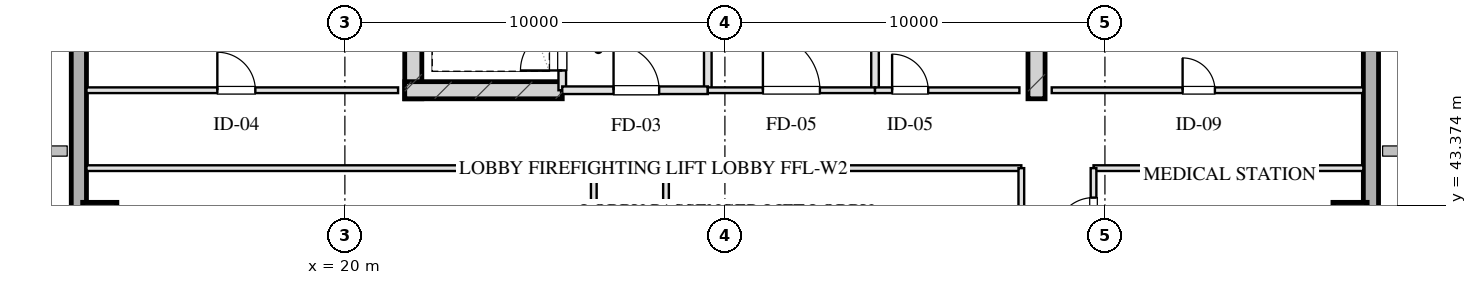
"""IFC4 building model, lengths in metres.
Left out: names, types, materials, properties, quantities, classifications, styles, units other than length and angle.
Written with IfcOpenShell. Run it as: python <this file> out.ifc"""

import sys

from ifc_helpers import new_model, si_unit, direction, frame, frame_2d, origin, origin_2d, place, context, subcontext, project, spatial, rectangle, hollow_rectangle, extrude, element, fill, save


model = new_model("IFC4")
c1 = context("Model", 3, precision=1e-05, world=origin(), true_north=direction((0.0, 1.0)))
c2 = subcontext(c1, "Body", "Model", "MODEL_VIEW")
j1 = project(units=[si_unit("LENGTHUNIT", "METRE"), si_unit("PLANEANGLEUNIT", "RADIAN")], contexts=[c1])
p1 = place(None, origin())
s1 = spatial("IfcSite", under=j1, at=p1, CompositionType="ELEMENT")
p2 = place(p1, origin())
s2 = spatial("IfcBuilding", under=s1, at=p2, CompositionType="ELEMENT")
p3 = place(p2, frame((0.0, 0.0, 205.85)))
s3 = spatial("IfcBuildingStorey", under=s2, at=p3, CompositionType="ELEMENT", Elevation=205.85)
for number, where, z_axis, x_axis in (
    (1, (21.8, 46.175, 0.0), (0.0, 0.0, 1.0), (0.0, 1.0, 0.0)),
    (2, (38.2, 46.175, 0.0), (0.0, 0.0, 1.0), (0.0, 1.0, 0.0)),
):
    element("IfcWall", number, at=place(p3, frame(where, z_axis=z_axis, x_axis=x_axis)), inside=s3, PredefinedType="SHEAR", context=c2, shape_type="SweptSolid", body=[
        extrude(rectangle(XDim=9.33, YDim=0.45, at=frame_2d((4.665, 0.0))), origin(), (0.0, 0.0, 1.0), 3.45),
    ])
p4 = place(p3, frame((21.575, 46.4, 0.0), z_axis=(0.0, 0.0, 1.0), x_axis=(1.0, 0.0, 0.0)))
e3 = element("IfcWall", 3, at=p4, inside=s3, PredefinedType="SHEAR", context=c2, shape_type="SweptSolid", body=[
    extrude(rectangle(XDim=4.145, YDim=0.45, at=frame_2d((2.073, 0.0))), origin(), (0.0, 0.0, 1.0), 3.45),
])
for number, where, z_axis, x_axis in (
    (4, (13.55, 43.0, 0.0), (0.0, 0.0, 1.0), (1.0, 0.0, 0.0)),
    (5, (46.45, 43.0, 0.0), (0.0, 0.0, 1.0), (1.0, 0.0, 0.0)),
):
    element("IfcColumn", number, at=place(p3, frame(where, z_axis=z_axis, x_axis=x_axis)), inside=s3, PredefinedType="COLUMN", context=c2, shape_type="SweptSolid", body=[
        extrude(hollow_rectangle(XDim=0.9, YDim=0.9, WallThickness=0.032, at=origin_2d()), origin(), (0.0, 0.0, 1.0), 3.451),
    ])
p5 = place(p3, frame((13.0, 10.8, 0.0), z_axis=(0.0, 0.0, 1.0), x_axis=(0.0, 1.0, 0.0)))
e6 = element("IfcWall", 6, at=p5, inside=s3, PredefinedType="SOLIDWALL", context=c2, shape_type="SweptSolid", body=[
    extrude(rectangle(XDim=46.4, YDim=0.4, at=frame_2d((23.2, 0.0))), origin(), (0.0, 0.0, 1.0), 2.61),
])
p6 = place(p5, frame((15.75, 0.0, 0.75)))
e7 = element("IfcOpeningElement", 7, at=p6, cuts=e6, PredefinedType="OPENING", context=c2, shape_type="SweptSolid", body=[
    extrude(rectangle(XDim=2.1, YDim=1.46, at=frame_2d((1.05, 0.73))), frame((0.0, 0.21, 0.0), z_axis=(0.0, -1.0, 0.0), x_axis=(1.0, 0.0, 0.0)), (0.0, 0.0, 1.0), 0.42),
])
p7 = place(p5, frame((19.55, 0.0, 0.75)))
e8 = element("IfcOpeningElement", 8, at=p7, cuts=e6, PredefinedType="OPENING", context=c2, shape_type="SweptSolid", body=[
    extrude(rectangle(XDim=2.1, YDim=1.46, at=frame_2d((1.05, 0.73))), frame((0.0, 0.21, 0.0), z_axis=(0.0, -1.0, 0.0), x_axis=(1.0, 0.0, 0.0)), (0.0, 0.0, 1.0), 0.42),
])
p8 = place(p5, frame((27.05, 0.0, 0.0)))
e9 = element("IfcOpeningElement", 9, at=p8, cuts=e6, PredefinedType="OPENING", context=c2, shape_type="SweptSolid", body=[
    extrude(rectangle(XDim=1.1, YDim=2.15, at=frame_2d((0.55, 1.075))), frame((0.0, 0.21, 0.0), z_axis=(0.0, -1.0, 0.0), x_axis=(1.0, 0.0, 0.0)), (0.0, 0.0, 1.0), 0.42),
])
p9 = place(p3, frame((47.0, 57.2, 0.0), z_axis=(0.0, 0.0, 1.0), x_axis=(0.0, -1.0, 0.0)))
e10 = element("IfcWall", 10, at=p9, inside=s3, PredefinedType="SOLIDWALL", context=c2, shape_type="SweptSolid", body=[
    extrude(rectangle(XDim=46.4, YDim=0.4, at=frame_2d((23.2, 0.0))), origin(), (0.0, 0.0, 1.0), 2.61),
])
p10 = place(p9, frame((28.55, 0.0, 0.75)))
e11 = element("IfcOpeningElement", 11, at=p10, cuts=e10, PredefinedType="OPENING", context=c2, shape_type="SweptSolid", body=[
    extrude(rectangle(XDim=2.1, YDim=1.46, at=frame_2d((1.05, 0.73))), frame((0.0, 0.21, 0.0), z_axis=(0.0, -1.0, 0.0), x_axis=(1.0, 0.0, 0.0)), (0.0, 0.0, 1.0), 0.42),
])
p11 = place(p9, frame((24.75, 0.0, 0.75)))
e12 = element("IfcOpeningElement", 12, at=p11, cuts=e10, PredefinedType="OPENING", context=c2, shape_type="SweptSolid", body=[
    extrude(rectangle(XDim=2.1, YDim=1.46, at=frame_2d((1.05, 0.73))), frame((0.0, 0.21, 0.0), z_axis=(0.0, -1.0, 0.0), x_axis=(1.0, 0.0, 0.0)), (0.0, 0.0, 1.0), 0.42),
])
p12 = place(p9, frame((16.667, 0.0, 0.0)))
e13 = element("IfcOpeningElement", 13, at=p12, cuts=e10, PredefinedType="OPENING", context=c2, shape_type="SweptSolid", body=[
    extrude(rectangle(XDim=1.1, YDim=2.15, at=frame_2d((0.55, 1.075))), frame((0.0, 0.21, 0.0), z_axis=(0.0, -1.0, 0.0), x_axis=(1.0, 0.0, 0.0)), (0.0, 0.0, 1.0), 0.42),
])
p13 = place(p3, frame((25.72, 46.4, 0.0), z_axis=(0.0, 0.0, 1.0), x_axis=(0.0, 1.0, 0.0)))
e14 = element("IfcWall", 14, at=p13, inside=s3, PredefinedType="PARTITIONING", context=c2, shape_type="SweptSolid", body=[
    extrude(rectangle(XDim=1.9, YDim=0.2, at=frame_2d((0.95, 0.0))), origin(), (0.0, 0.0, 1.0), 3.175),
])
p14 = place(p13, frame((0.52, 0.0, 0.0)))
e15 = element("IfcOpeningElement", 15, at=p14, cuts=e14, PredefinedType="OPENING", context=c2, shape_type="SweptSolid", body=[
    extrude(rectangle(XDim=1.1, YDim=2.05, at=frame_2d((0.55, 1.025))), frame((0.0, 0.11, 0.0), z_axis=(0.0, -1.0, 0.0), x_axis=(1.0, 0.0, 0.0)), (0.0, 0.0, 1.0), 0.22),
])
p15 = place(p3, frame((29.55, 46.4, 0.0), z_axis=(0.0, 0.0, 1.0), x_axis=(0.0, 1.0, 0.0)))
e16 = element("IfcWall", 16, at=p15, inside=s3, PredefinedType="PARTITIONING", context=c2, shape_type="SweptSolid", body=[
    extrude(rectangle(XDim=8.43, YDim=0.2, at=frame_2d((4.215, 0.0))), origin(), (0.0, 0.0, 1.0), 3.175),
])
p16 = place(p3, frame((25.72, 46.4, 0.0), z_axis=(0.0, 0.0, 1.0), x_axis=(1.0, 0.0, 0.0)))
e17 = element("IfcWall", 17, at=p16, inside=s3, PredefinedType="PARTITIONING", context=c2, shape_type="SweptSolid", body=[
    extrude(rectangle(XDim=3.83, YDim=0.2, at=frame_2d((1.915, 0.0))), origin(), (0.0, 0.0, 1.0), 3.175),
])
p17 = place(p16, frame((1.35, 0.0, 0.0)))
e18 = element("IfcOpeningElement", 18, at=p17, cuts=e17, PredefinedType="OPENING", context=c2, shape_type="SweptSolid", body=[
    extrude(rectangle(XDim=1.2, YDim=2.05, at=frame_2d((0.6, 1.025))), frame((0.0, 0.11, 0.0), z_axis=(0.0, -1.0, 0.0), x_axis=(1.0, 0.0, 0.0)), (0.0, 0.0, 1.0), 0.22),
])
p18 = place(p3, frame((33.95, 46.4, 0.0), z_axis=(0.0, 0.0, 1.0), x_axis=(0.0, 1.0, 0.0)))
e19 = element("IfcWall", 19, at=p18, inside=s3, PredefinedType="PARTITIONING", context=c2, shape_type="SweptSolid", body=[
    extrude(rectangle(XDim=8.43, YDim=0.2, at=frame_2d((4.215, 0.0))), origin(), (0.0, 0.0, 1.0), 3.175),
])
p19 = place(p3, frame((29.55, 46.4, 0.0), z_axis=(0.0, 0.0, 1.0), x_axis=(1.0, 0.0, 0.0)))
e20 = element("IfcWall", 20, at=p19, inside=s3, PredefinedType="PARTITIONING", context=c2, shape_type="SweptSolid", body=[
    extrude(rectangle(XDim=4.4, YDim=0.15, at=frame_2d((2.2, 0.0))), origin(), (0.0, 0.0, 1.0), 3.175),
])
p20 = place(p19, frame((1.45, 0.0, 0.0)))
e21 = element("IfcOpeningElement", 21, at=p20, cuts=e20, PredefinedType="OPENING", context=c2, shape_type="SweptSolid", body=[
    extrude(rectangle(XDim=1.5, YDim=2.05, at=frame_2d((0.75, 1.025))), frame((0.0, 0.085, 0.0), z_axis=(0.0, -1.0, 0.0), x_axis=(1.0, 0.0, 0.0)), (0.0, 0.0, 1.0), 0.17),
])
p21 = place(p3, frame((33.95, 46.4, 0.0), z_axis=(0.0, 0.0, 1.0), x_axis=(1.0, 0.0, 0.0)))
e22 = element("IfcWall", 22, at=p21, inside=s3, PredefinedType="PARTITIONING", context=c2, shape_type="SweptSolid", body=[
    extrude(rectangle(XDim=3.8, YDim=0.15, at=frame_2d((1.9, 0.0))), origin(), (0.0, 0.0, 1.0), 3.175),
])
p22 = place(p21, frame((0.45, 0.0, 0.0)))
e23 = element("IfcOpeningElement", 23, at=p22, cuts=e22, PredefinedType="OPENING", context=c2, shape_type="SweptSolid", body=[
    extrude(rectangle(XDim=0.95, YDim=2.05, at=frame_2d((0.475, 1.025))), frame((0.0, 0.085, 0.0), z_axis=(0.0, -1.0, 0.0), x_axis=(1.0, 0.0, 0.0)), (0.0, 0.0, 1.0), 0.17),
])
p23 = place(p3, frame((13.2, 46.4, 0.0), z_axis=(0.0, 0.0, 1.0), x_axis=(1.0, 0.0, 0.0)))
e24 = element("IfcWall", 24, at=p23, inside=s3, PredefinedType="PARTITIONING", context=c2, shape_type="SweptSolid", body=[
    extrude(rectangle(XDim=8.2, YDim=0.15, at=frame_2d((4.1, 0.0))), origin(), (0.0, 0.0, 1.0), 3.175),
])
p24 = place(p23, frame((3.444, 0.0, 0.0)))
e25 = element("IfcOpeningElement", 25, at=p24, cuts=e24, PredefinedType="OPENING", context=c2, shape_type="SweptSolid", body=[
    extrude(rectangle(XDim=1.0, YDim=2.05, at=frame_2d((0.5, 1.025))), frame((0.0, 0.085, 0.0), z_axis=(0.0, -1.0, 0.0), x_axis=(1.0, 0.0, 0.0)), (0.0, 0.0, 1.0), 0.17),
])
p25 = place(p3, frame((38.6, 46.4, 0.0), z_axis=(0.0, 0.0, 1.0), x_axis=(1.0, 0.0, 0.0)))
e26 = element("IfcWall", 26, at=p25, inside=s3, PredefinedType="PARTITIONING", context=c2, shape_type="SweptSolid", body=[
    extrude(rectangle(XDim=8.2, YDim=0.15, at=frame_2d((4.1, 0.0))), origin(), (0.0, 0.0, 1.0), 3.175),
])
p26 = place(p25, frame((3.444, 0.0, 0.0)))
e27 = element("IfcOpeningElement", 27, at=p26, cuts=e26, PredefinedType="OPENING", context=c2, shape_type="SweptSolid", body=[
    extrude(rectangle(XDim=0.85, YDim=2.05, at=frame_2d((0.425, 1.025))), frame((0.0, 0.085, 0.0), z_axis=(0.0, -1.0, 0.0), x_axis=(1.0, 0.0, 0.0)), (0.0, 0.0, 1.0), 0.17),
])
p27 = place(p3, frame((13.2, 44.35, 0.0), z_axis=(0.0, 0.0, 1.0), x_axis=(1.0, 0.0, 0.0)))
e28 = element("IfcWall", 28, at=p27, inside=s3, PredefinedType="PARTITIONING", context=c2, shape_type="SweptSolid", body=[
    extrude(rectangle(XDim=13.35, YDim=0.15, at=frame_2d((6.675, 0.0))), origin(), (0.0, 0.0, 1.0), 3.175),
])
p28 = place(p3, frame((28.45, 44.35, 0.0), z_axis=(0.0, 0.0, 1.0), x_axis=(1.0, 0.0, 0.0)))
e29 = element("IfcWall", 29, at=p28, inside=s3, PredefinedType="PARTITIONING", context=c2, shape_type="SweptSolid", body=[
    extrude(rectangle(XDim=9.35, YDim=0.15, at=frame_2d((4.675, 0.0))), origin(), (0.0, 0.0, 1.0), 3.175),
])
p29 = place(p3, frame((39.7, 44.35, 0.0), z_axis=(0.0, 0.0, 1.0), x_axis=(1.0, 0.0, 0.0)))
e30 = element("IfcWall", 30, at=p29, inside=s3, PredefinedType="PARTITIONING", context=c2, shape_type="SweptSolid", body=[
    extrude(rectangle(XDim=7.1, YDim=0.15, at=frame_2d((3.55, 0.0))), origin(), (0.0, 0.0, 1.0), 3.175),
])
p30 = place(p3, frame((26.55, 23.65, 0.0), z_axis=(0.0, 0.0, 1.0), x_axis=(0.0, 1.0, 0.0)))
e31 = element("IfcWall", 31, at=p30, inside=s3, PredefinedType="PARTITIONING", context=c2, shape_type="SweptSolid", body=[
    extrude(rectangle(XDim=20.7, YDim=0.15, at=frame_2d((10.35, 0.0))), origin(), (0.0, 0.0, 1.0), 3.175),
])
p31 = place(p30, frame((4.075, 0.0, 0.0)))
e32 = element("IfcOpeningElement", 32, at=p31, cuts=e31, PredefinedType="OPENING", context=c2, shape_type="SweptSolid", body=[
    extrude(rectangle(XDim=1.0, YDim=2.05, at=frame_2d((0.5, 1.025))), frame((0.0, 0.085, 0.0), z_axis=(0.0, -1.0, 0.0), x_axis=(1.0, 0.0, 0.0)), (0.0, 0.0, 1.0), 0.17),
])
p32 = place(p30, frame((14.425, 0.0, 0.0)))
e33 = element("IfcOpeningElement", 33, at=p32, cuts=e31, PredefinedType="OPENING", context=c2, shape_type="SweptSolid", body=[
    extrude(rectangle(XDim=1.0, YDim=2.05, at=frame_2d((0.5, 1.025))), frame((0.0, 0.085, 0.0), z_axis=(0.0, -1.0, 0.0), x_axis=(1.0, 0.0, 0.0)), (0.0, 0.0, 1.0), 0.17),
])
p33 = place(p3, frame((28.45, 23.65, 0.0), z_axis=(0.0, 0.0, 1.0), x_axis=(0.0, 1.0, 0.0)))
e34 = element("IfcWall", 34, at=p33, inside=s3, PredefinedType="PARTITIONING", context=c2, shape_type="SweptSolid", body=[
    extrude(rectangle(XDim=20.7, YDim=0.15, at=frame_2d((10.35, 0.0))), origin(), (0.0, 0.0, 1.0), 3.175),
])
p34 = place(p33, frame((9.936, 0.0, 0.0)))
e35 = element("IfcOpeningElement", 35, at=p34, cuts=e34, PredefinedType="OPENING", context=c2, shape_type="SweptSolid", body=[
    extrude(rectangle(XDim=1.1, YDim=2.05, at=frame_2d((0.55, 1.025))), frame((0.0, 0.085, 0.0), z_axis=(0.0, -1.0, 0.0), x_axis=(1.0, 0.0, 0.0)), (0.0, 0.0, 1.0), 0.17),
])
p35 = place(p3, frame((37.8, 23.65, 0.0), z_axis=(0.0, 0.0, 1.0), x_axis=(0.0, 1.0, 0.0)))
e36 = element("IfcWall", 36, at=p35, inside=s3, PredefinedType="PARTITIONING", context=c2, shape_type="SweptSolid", body=[
    extrude(rectangle(XDim=20.7, YDim=0.15, at=frame_2d((10.35, 0.0))), origin(), (0.0, 0.0, 1.0), 3.175),
])
p36 = place(p3, frame((39.7, 23.65, 0.0), z_axis=(0.0, 0.0, 1.0), x_axis=(0.0, 1.0, 0.0)))
e37 = element("IfcWall", 37, at=p36, inside=s3, PredefinedType="PARTITIONING", context=c2, shape_type="SweptSolid", body=[
    extrude(rectangle(XDim=20.7, YDim=0.15, at=frame_2d((10.35, 0.0))), origin(), (0.0, 0.0, 1.0), 3.175),
])
p37 = place(p36, frame((0.775, 0.0, 0.0)))
e38 = element("IfcOpeningElement", 38, at=p37, cuts=e37, PredefinedType="OPENING", context=c2, shape_type="SweptSolid", body=[
    extrude(rectangle(XDim=1.0, YDim=2.05, at=frame_2d((0.5, 1.025))), frame((0.0, 0.085, 0.0), z_axis=(0.0, -1.0, 0.0), x_axis=(1.0, 0.0, 0.0)), (0.0, 0.0, 1.0), 0.17),
])
p38 = place(p36, frame((3.95, 0.0, 0.0)))
e39 = element("IfcOpeningElement", 39, at=p38, cuts=e37, PredefinedType="OPENING", context=c2, shape_type="SweptSolid", body=[
    extrude(rectangle(XDim=1.0, YDim=2.05, at=frame_2d((0.5, 1.025))), frame((0.0, 0.085, 0.0), z_axis=(0.0, -1.0, 0.0), x_axis=(1.0, 0.0, 0.0)), (0.0, 0.0, 1.0), 0.17),
])
p39 = place(p36, frame((8.19, 0.0, 0.0)))
e40 = element("IfcOpeningElement", 40, at=p39, cuts=e37, PredefinedType="OPENING", context=c2, shape_type="SweptSolid", body=[
    extrude(rectangle(XDim=1.0, YDim=2.05, at=frame_2d((0.5, 1.025))), frame((0.0, 0.085, 0.0), z_axis=(0.0, -1.0, 0.0), x_axis=(1.0, 0.0, 0.0)), (0.0, 0.0, 1.0), 0.17),
])
p40 = place(p36, frame((12.373, 0.0, 0.0)))
e41 = element("IfcOpeningElement", 41, at=p40, cuts=e37, PredefinedType="OPENING", context=c2, shape_type="SweptSolid", body=[
    extrude(rectangle(XDim=1.0, YDim=2.05, at=frame_2d((0.5, 1.025))), frame((0.0, 0.085, 0.0), z_axis=(0.0, -1.0, 0.0), x_axis=(1.0, 0.0, 0.0)), (0.0, 0.0, 1.0), 0.17),
])
p41 = place(p36, frame((15.933, 0.0, 0.0)))
e42 = element("IfcOpeningElement", 42, at=p41, cuts=e37, PredefinedType="OPENING", context=c2, shape_type="SweptSolid", body=[
    extrude(rectangle(XDim=1.0, YDim=2.05, at=frame_2d((0.5, 1.025))), frame((0.0, 0.085, 0.0), z_axis=(0.0, -1.0, 0.0), x_axis=(1.0, 0.0, 0.0)), (0.0, 0.0, 1.0), 0.17),
])
p42 = place(p36, frame((18.925, 0.0, 0.0)))
e43 = element("IfcOpeningElement", 43, at=p42, cuts=e37, PredefinedType="OPENING", context=c2, shape_type="SweptSolid", body=[
    extrude(rectangle(XDim=1.0, YDim=2.05, at=frame_2d((0.5, 1.025))), frame((0.0, 0.085, 0.0), z_axis=(0.0, -1.0, 0.0), x_axis=(1.0, 0.0, 0.0)), (0.0, 0.0, 1.0), 0.17),
])
p43 = place(p14, origin())
e44 = element("IfcDoor", 44, at=p43, inside=s3, OperationType="SINGLE_SWING_LEFT", PredefinedType="DOOR", context=c2, shape_type="SweptSolid", body=[
    extrude(rectangle(XDim=1.1, YDim=2.05, at=frame_2d((0.55, 1.025))), frame((0.0, 0.025, 0.0), z_axis=(0.0, -1.0, 0.0), x_axis=(1.0, 0.0, 0.0)), (0.0, 0.0, 1.0), 0.05),
])
fill(e15, e44)
p44 = place(p17, origin())
e45 = element("IfcDoor", 45, at=p44, inside=s3, OperationType="SINGLE_SWING_LEFT", PredefinedType="DOOR", context=c2, shape_type="SweptSolid", body=[
    extrude(rectangle(XDim=1.2, YDim=2.05, at=frame_2d((0.6, 1.025))), frame((0.0, 0.025, 0.0), z_axis=(0.0, -1.0, 0.0), x_axis=(1.0, 0.0, 0.0)), (0.0, 0.0, 1.0), 0.05),
])
fill(e18, e45)
p45 = place(p20, origin())
e46 = element("IfcDoor", 46, at=p45, inside=s3, OperationType="SINGLE_SWING_LEFT", PredefinedType="DOOR", context=c2, shape_type="SweptSolid", body=[
    extrude(rectangle(XDim=1.5, YDim=2.05, at=frame_2d((0.75, 1.025))), frame((0.0, 0.025, 0.0), z_axis=(0.0, -1.0, 0.0), x_axis=(1.0, 0.0, 0.0)), (0.0, 0.0, 1.0), 0.05),
])
fill(e21, e46)
p46 = place(p22, origin())
e47 = element("IfcDoor", 47, at=p46, inside=s3, OperationType="SINGLE_SWING_LEFT", PredefinedType="DOOR", context=c2, shape_type="SweptSolid", body=[
    extrude(rectangle(XDim=0.95, YDim=2.05, at=frame_2d((0.475, 1.025))), frame((0.0, 0.025, 0.0), z_axis=(0.0, -1.0, 0.0), x_axis=(1.0, 0.0, 0.0)), (0.0, 0.0, 1.0), 0.05),
])
fill(e23, e47)
p47 = place(p24, origin())
e48 = element("IfcDoor", 48, at=p47, inside=s3, OperationType="SINGLE_SWING_LEFT", PredefinedType="DOOR", context=c2, shape_type="SweptSolid", body=[
    extrude(rectangle(XDim=1.0, YDim=2.05, at=frame_2d((0.5, 1.025))), frame((0.0, 0.025, 0.0), z_axis=(0.0, -1.0, 0.0), x_axis=(1.0, 0.0, 0.0)), (0.0, 0.0, 1.0), 0.05),
])
fill(e25, e48)
p48 = place(p26, origin())
e49 = element("IfcDoor", 49, at=p48, inside=s3, OperationType="SINGLE_SWING_LEFT", PredefinedType="DOOR", context=c2, shape_type="SweptSolid", body=[
    extrude(rectangle(XDim=0.85, YDim=2.05, at=frame_2d((0.425, 1.025))), frame((0.0, 0.025, 0.0), z_axis=(0.0, -1.0, 0.0), x_axis=(1.0, 0.0, 0.0)), (0.0, 0.0, 1.0), 0.05),
])
fill(e27, e49)
p49 = place(p42, origin())
e50 = element("IfcDoor", 50, at=p49, inside=s3, OperationType="SINGLE_SWING_LEFT", PredefinedType="DOOR", context=c2, shape_type="SweptSolid", body=[
    extrude(rectangle(XDim=1.0, YDim=2.05, at=frame_2d((0.5, 1.025))), frame((0.0, 0.025, 0.0), z_axis=(0.0, -1.0, 0.0), x_axis=(1.0, 0.0, 0.0)), (0.0, 0.0, 1.0), 0.05),
])
fill(e43, e50)
save(model, sys.argv[1])
